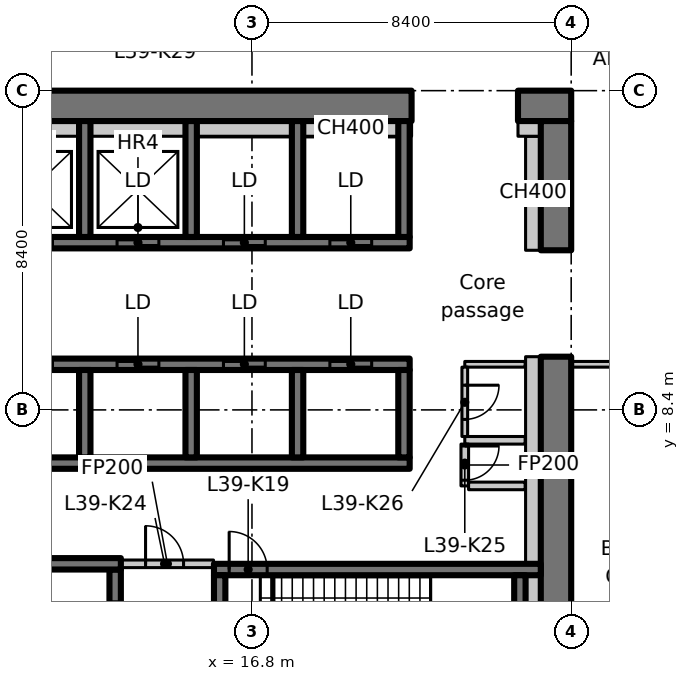
"""IFC4 building model, lengths in metres.
Left out: names, types, materials, properties, quantities, classifications, styles, units other than length and angle.
Written with IfcOpenShell. Run it as: python <this file> out.ifc"""

import sys

from ifc_helpers import new_model, si_unit, direction, frame, frame_2d, origin, place, context, subcontext, project, spatial, rectangle, extrude, element, fill, save


model = new_model("IFC4")
c1 = context("Model", 3, precision=1e-05, world=origin(), true_north=direction((0.0, 1.0)))
c2 = subcontext(c1, "Body", "Model", "MODEL_VIEW")
j1 = project(units=[si_unit("LENGTHUNIT", "METRE"), si_unit("PLANEANGLEUNIT", "RADIAN")], contexts=[c1])
p1 = place(None, origin())
s1 = spatial("IfcSite", under=j1, at=p1, CompositionType="ELEMENT")
p2 = place(p1, origin())
s2 = spatial("IfcBuilding", under=s1, at=p2, CompositionType="ELEMENT")
p3 = place(p2, frame((0.0, 0.0, 156.5)))
s3 = spatial("IfcBuildingStorey", under=s2, at=p3, CompositionType="ELEMENT", Elevation=156.5)
p4 = place(p3, frame((-1.1, 16.4, 0.0), z_axis=(0.0, 0.0, 1.0), x_axis=(1.0, 0.0, 0.0)))
e1 = element("IfcWall", 1, at=p4, inside=s3, PredefinedType="SHEAR", context=c2, shape_type="SweptSolid", body=[
    extrude(rectangle(XDim=22.1, YDim=0.8, at=frame_2d((11.05, 0.0))), origin(), (0.0, 0.0, 1.0), 5.2),
])
p5 = place(p4, frame((3.15, 0.0, 0.0)))
e2 = element("IfcOpeningElement", 2, at=p5, cuts=e1, PredefinedType="OPENING", context=c2, shape_type="SweptSolid", body=[
    extrude(rectangle(XDim=1.1, YDim=2.3, at=frame_2d((0.55, 1.15))), frame((0.0, 0.41, 0.0), z_axis=(0.0, -1.0, 0.0), x_axis=(1.0, 0.0, 0.0)), (0.0, 0.0, 1.0), 0.82),
])
p6 = place(p3, frame((23.8, 16.4, 0.0), z_axis=(0.0, 0.0, 1.0), x_axis=(1.0, 0.0, 0.0)))
e3 = element("IfcWall", 3, at=p6, inside=s3, PredefinedType="SHEAR", context=c2, shape_type="SweptSolid", body=[
    extrude(rectangle(XDim=1.4, YDim=0.8, at=frame_2d((0.7, 0.0))), origin(), (0.0, 0.0, 1.0), 5.2),
])
p7 = place(p3, frame((24.8, 0.8, 0.0), z_axis=(0.0, 0.0, 1.0), x_axis=(0.0, 1.0, 0.0)))
e4 = element("IfcWall", 4, at=p7, inside=s3, PredefinedType="SHEAR", context=c2, shape_type="SweptSolid", body=[
    extrude(rectangle(XDim=9.0, YDim=0.8, at=frame_2d((4.5, 0.0))), origin(), (0.0, 0.0, 1.0), 5.2),
])
p8 = place(p3, frame((24.8, 12.6, 0.0), z_axis=(0.0, 0.0, 1.0), x_axis=(0.0, 1.0, 0.0)))
e5 = element("IfcWall", 5, at=p8, inside=s3, PredefinedType="SHEAR", context=c2, shape_type="SweptSolid", body=[
    extrude(rectangle(XDim=3.4, YDim=0.8, at=frame_2d((1.7, 0.0))), origin(), (0.0, 0.0, 1.0), 5.2),
])
p9 = place(p3, frame((24.2, 12.6, 0.0), z_axis=(0.0, 0.0, 1.0), x_axis=(0.0, 1.0, 0.0)))
e6 = element("IfcWall", 6, at=p9, inside=s3, PredefinedType="PARTITIONING", context=c2, shape_type="SweptSolid", body=[
    extrude(rectangle(XDim=3.0, YDim=0.4, at=frame_2d((1.5, 0.0))), origin(), (0.0, 0.0, 1.0), 5.2),
])
p10 = place(p3, frame((23.8, 15.8, 0.0), z_axis=(0.0, 0.0, 1.0), x_axis=(1.0, 0.0, 0.0)))
e7 = element("IfcWall", 7, at=p10, inside=s3, PredefinedType="PARTITIONING", context=c2, shape_type="SweptSolid", body=[
    extrude(rectangle(XDim=0.6, YDim=0.4, at=frame_2d((0.3, 0.0))), origin(), (0.0, 0.0, 1.0), 5.2),
])
p11 = place(p3, frame((0.8, 7.0, 0.0), z_axis=(0.0, 0.0, 1.0), x_axis=(1.0, 0.0, 0.0)))
e8 = element("IfcWall", 8, at=p11, inside=s3, PredefinedType="SHEAR", context=c2, shape_type="SweptSolid", body=[
    extrude(rectangle(XDim=20.15, YDim=0.3, at=frame_2d((10.075, 0.0))), origin(), (0.0, 0.0, 1.0), 5.2),
])
p12 = place(p3, frame((0.8, 9.6, 0.0), z_axis=(0.0, 0.0, 1.0), x_axis=(1.0, 0.0, 0.0)))
e9 = element("IfcWall", 9, at=p12, inside=s3, PredefinedType="SHEAR", context=c2, shape_type="SweptSolid", body=[
    extrude(rectangle(XDim=20.15, YDim=0.3, at=frame_2d((10.075, 0.0))), origin(), (0.0, 0.0, 1.0), 5.2),
])
p13 = place(p12, frame((1.25, 0.0, 0.0)))
e10 = element("IfcOpeningElement", 10, at=p13, cuts=e9, PredefinedType="OPENING", context=c2, shape_type="SweptSolid", body=[
    extrude(rectangle(XDim=1.1, YDim=2.3, at=frame_2d((0.55, 1.15))), frame((0.0, 0.16, 0.0), z_axis=(0.0, -1.0, 0.0), x_axis=(1.0, 0.0, 0.0)), (0.0, 0.0, 1.0), 0.32),
])
p14 = place(p12, frame((4.05, 0.0, 0.0)))
e11 = element("IfcOpeningElement", 11, at=p14, cuts=e9, PredefinedType="OPENING", context=c2, shape_type="SweptSolid", body=[
    extrude(rectangle(XDim=1.1, YDim=2.3, at=frame_2d((0.55, 1.15))), frame((0.0, 0.16, 0.0), z_axis=(0.0, -1.0, 0.0), x_axis=(1.0, 0.0, 0.0)), (0.0, 0.0, 1.0), 0.32),
])
p15 = place(p12, frame((6.85, 0.0, 0.0)))
e12 = element("IfcOpeningElement", 12, at=p15, cuts=e9, PredefinedType="OPENING", context=c2, shape_type="SweptSolid", body=[
    extrude(rectangle(XDim=1.1, YDim=2.3, at=frame_2d((0.55, 1.15))), frame((0.0, 0.16, 0.0), z_axis=(0.0, -1.0, 0.0), x_axis=(1.0, 0.0, 0.0)), (0.0, 0.0, 1.0), 0.32),
])
p16 = place(p12, frame((9.65, 0.0, 0.0)))
e13 = element("IfcOpeningElement", 13, at=p16, cuts=e9, PredefinedType="OPENING", context=c2, shape_type="SweptSolid", body=[
    extrude(rectangle(XDim=1.1, YDim=2.3, at=frame_2d((0.55, 1.15))), frame((0.0, 0.16, 0.0), z_axis=(0.0, -1.0, 0.0), x_axis=(1.0, 0.0, 0.0)), (0.0, 0.0, 1.0), 0.32),
])
p17 = place(p12, frame((12.45, 0.0, 0.0)))
e14 = element("IfcOpeningElement", 14, at=p17, cuts=e9, PredefinedType="OPENING", context=c2, shape_type="SweptSolid", body=[
    extrude(rectangle(XDim=1.1, YDim=2.3, at=frame_2d((0.55, 1.15))), frame((0.0, 0.16, 0.0), z_axis=(0.0, -1.0, 0.0), x_axis=(1.0, 0.0, 0.0)), (0.0, 0.0, 1.0), 0.32),
])
p18 = place(p12, frame((15.25, 0.0, 0.0)))
e15 = element("IfcOpeningElement", 15, at=p18, cuts=e9, PredefinedType="OPENING", context=c2, shape_type="SweptSolid", body=[
    extrude(rectangle(XDim=1.1, YDim=2.3, at=frame_2d((0.55, 1.15))), frame((0.0, 0.16, 0.0), z_axis=(0.0, -1.0, 0.0), x_axis=(1.0, 0.0, 0.0)), (0.0, 0.0, 1.0), 0.32),
])
p19 = place(p12, frame((18.05, 0.0, 0.0)))
e16 = element("IfcOpeningElement", 16, at=p19, cuts=e9, PredefinedType="OPENING", context=c2, shape_type="SweptSolid", body=[
    extrude(rectangle(XDim=1.1, YDim=2.3, at=frame_2d((0.55, 1.15))), frame((0.0, 0.16, 0.0), z_axis=(0.0, -1.0, 0.0), x_axis=(1.0, 0.0, 0.0)), (0.0, 0.0, 1.0), 0.32),
])
for number, where, z_axis, x_axis in (
    (17, (12.4, 7.15, 0.0), (0.0, 0.0, 1.0), (0.0, 1.0, 0.0)),
    (18, (15.2, 7.15, 0.0), (0.0, 0.0, 1.0), (0.0, 1.0, 0.0)),
    (19, (18.0, 7.15, 0.0), (0.0, 0.0, 1.0), (0.0, 1.0, 0.0)),
    (20, (20.8, 7.15, 0.0), (0.0, 0.0, 1.0), (0.0, 1.0, 0.0)),
):
    element("IfcWall", number, at=place(p3, frame(where, z_axis=z_axis, x_axis=x_axis)), inside=s3, PredefinedType="SHEAR", context=c2, shape_type="SweptSolid", body=[
        extrude(rectangle(XDim=2.3, YDim=0.3, at=frame_2d((1.15, 0.0))), origin(), (0.0, 0.0, 1.0), 5.2),
    ])
p20 = place(p3, frame((0.8, 12.8, 0.0), z_axis=(0.0, 0.0, 1.0), x_axis=(1.0, 0.0, 0.0)))
e21 = element("IfcWall", 21, at=p20, inside=s3, PredefinedType="SHEAR", context=c2, shape_type="SweptSolid", body=[
    extrude(rectangle(XDim=20.15, YDim=0.3, at=frame_2d((10.075, 0.0))), origin(), (0.0, 0.0, 1.0), 5.2),
])
p21 = place(p20, frame((4.05, 0.0, 0.0)))
e22 = element("IfcOpeningElement", 22, at=p21, cuts=e21, PredefinedType="OPENING", context=c2, shape_type="SweptSolid", body=[
    extrude(rectangle(XDim=1.1, YDim=2.3, at=frame_2d((0.55, 1.15))), frame((0.0, 0.16, 0.0), z_axis=(0.0, -1.0, 0.0), x_axis=(1.0, 0.0, 0.0)), (0.0, 0.0, 1.0), 0.32),
])
p22 = place(p20, frame((6.85, 0.0, 0.0)))
e23 = element("IfcOpeningElement", 23, at=p22, cuts=e21, PredefinedType="OPENING", context=c2, shape_type="SweptSolid", body=[
    extrude(rectangle(XDim=1.1, YDim=2.3, at=frame_2d((0.55, 1.15))), frame((0.0, 0.16, 0.0), z_axis=(0.0, -1.0, 0.0), x_axis=(1.0, 0.0, 0.0)), (0.0, 0.0, 1.0), 0.32),
])
p23 = place(p20, frame((9.65, 0.0, 0.0)))
e24 = element("IfcOpeningElement", 24, at=p23, cuts=e21, PredefinedType="OPENING", context=c2, shape_type="SweptSolid", body=[
    extrude(rectangle(XDim=1.1, YDim=2.3, at=frame_2d((0.55, 1.15))), frame((0.0, 0.16, 0.0), z_axis=(0.0, -1.0, 0.0), x_axis=(1.0, 0.0, 0.0)), (0.0, 0.0, 1.0), 0.32),
])
p24 = place(p20, frame((12.45, 0.0, 0.0)))
e25 = element("IfcOpeningElement", 25, at=p24, cuts=e21, PredefinedType="OPENING", context=c2, shape_type="SweptSolid", body=[
    extrude(rectangle(XDim=1.1, YDim=2.3, at=frame_2d((0.55, 1.15))), frame((0.0, 0.16, 0.0), z_axis=(0.0, -1.0, 0.0), x_axis=(1.0, 0.0, 0.0)), (0.0, 0.0, 1.0), 0.32),
])
p25 = place(p20, frame((15.25, 0.0, 0.0)))
e26 = element("IfcOpeningElement", 26, at=p25, cuts=e21, PredefinedType="OPENING", context=c2, shape_type="SweptSolid", body=[
    extrude(rectangle(XDim=1.1, YDim=2.3, at=frame_2d((0.55, 1.15))), frame((0.0, 0.16, 0.0), z_axis=(0.0, -1.0, 0.0), x_axis=(1.0, 0.0, 0.0)), (0.0, 0.0, 1.0), 0.32),
])
p26 = place(p20, frame((18.05, 0.0, 0.0)))
e27 = element("IfcOpeningElement", 27, at=p26, cuts=e21, PredefinedType="OPENING", context=c2, shape_type="SweptSolid", body=[
    extrude(rectangle(XDim=1.1, YDim=2.3, at=frame_2d((0.55, 1.15))), frame((0.0, 0.16, 0.0), z_axis=(0.0, -1.0, 0.0), x_axis=(1.0, 0.0, 0.0)), (0.0, 0.0, 1.0), 0.32),
])
for number, where, z_axis, x_axis in (
    (28, (12.4, 12.95, 0.0), (0.0, 0.0, 1.0), (0.0, 1.0, 0.0)),
    (29, (15.2, 12.95, 0.0), (0.0, 0.0, 1.0), (0.0, 1.0, 0.0)),
    (30, (18.0, 12.95, 0.0), (0.0, 0.0, 1.0), (0.0, 1.0, 0.0)),
    (31, (20.8, 12.95, 0.0), (0.0, 0.0, 1.0), (0.0, 1.0, 0.0)),
):
    element("IfcWall", number, at=place(p3, frame(where, z_axis=z_axis, x_axis=x_axis)), inside=s3, PredefinedType="SHEAR", context=c2, shape_type="SweptSolid", body=[
        extrude(rectangle(XDim=3.05, YDim=0.3, at=frame_2d((1.525, 0.0))), origin(), (0.0, 0.0, 1.0), 5.2),
    ])
p27 = place(p3, frame((13.2, 0.8, 0.0), z_axis=(0.0, 0.0, 1.0), x_axis=(0.0, 1.0, 0.0)))
e32 = element("IfcWall", 32, at=p27, inside=s3, PredefinedType="SHEAR", context=c2, shape_type="SweptSolid", body=[
    extrude(rectangle(XDim=3.4, YDim=0.3, at=frame_2d((1.7, 0.0))), origin(), (0.0, 0.0, 1.0), 5.2),
])
p28 = place(p27, frame((1.45, 0.0, 0.0)))
e33 = element("IfcOpeningElement", 33, at=p28, cuts=e32, PredefinedType="OPENING", context=c2, shape_type="SweptSolid", body=[
    extrude(rectangle(XDim=1.1, YDim=2.3, at=frame_2d((0.55, 1.15))), frame((0.0, 0.16, 0.0), z_axis=(0.0, -1.0, 0.0), x_axis=(1.0, 0.0, 0.0)), (0.0, 0.0, 1.0), 0.32),
])
p29 = place(p3, frame((10.05, 4.35, 0.0), z_axis=(0.0, 0.0, 1.0), x_axis=(1.0, 0.0, 0.0)))
e34 = element("IfcWall", 34, at=p29, inside=s3, PredefinedType="SHEAR", context=c2, shape_type="SweptSolid", body=[
    extrude(rectangle(XDim=3.3, YDim=0.3, at=frame_2d((1.65, 0.0))), origin(), (0.0, 0.0, 1.0), 5.2),
])
p30 = place(p3, frame((15.8, 4.2, 0.0), z_axis=(0.0, 0.0, 1.0), x_axis=(1.0, 0.0, 0.0)))
e35 = element("IfcWall", 35, at=p30, inside=s3, PredefinedType="SHEAR", context=c2, shape_type="SweptSolid", body=[
    extrude(rectangle(XDim=8.6, YDim=0.3, at=frame_2d((4.3, 0.0))), origin(), (0.0, 0.0, 1.0), 5.2),
])
p31 = place(p30, frame((0.4, 0.0, 0.0)))
e36 = element("IfcOpeningElement", 36, at=p31, cuts=e35, PredefinedType="OPENING", context=c2, shape_type="SweptSolid", body=[
    extrude(rectangle(XDim=1.0, YDim=2.1, at=frame_2d((0.5, 1.05))), frame((0.0, 0.16, 0.0), z_axis=(0.0, -1.0, 0.0), x_axis=(1.0, 0.0, 0.0)), (0.0, 0.0, 1.0), 0.32),
])
p32 = place(p3, frame((15.95, 1.5, 0.0), z_axis=(0.0, 0.0, 1.0), x_axis=(0.0, 1.0, 0.0)))
e37 = element("IfcWall", 37, at=p32, inside=s3, PredefinedType="SHEAR", context=c2, shape_type="SweptSolid", body=[
    extrude(rectangle(XDim=2.55, YDim=0.3, at=frame_2d((1.275, 0.0))), origin(), (0.0, 0.0, 1.0), 5.2),
])
p33 = place(p32, frame((0.8, 0.0, 0.0)))
e38 = element("IfcOpeningElement", 38, at=p33, cuts=e37, PredefinedType="OPENING", context=c2, shape_type="SweptSolid", body=[
    extrude(rectangle(XDim=1.0, YDim=2.1, at=frame_2d((0.5, 1.05))), frame((0.0, 0.16, 0.0), z_axis=(0.0, -1.0, 0.0), x_axis=(1.0, 0.0, 0.0)), (0.0, 0.0, 1.0), 0.32),
])
p34 = place(p3, frame((23.85, 1.5, 0.0), z_axis=(0.0, 0.0, 1.0), x_axis=(0.0, 1.0, 0.0)))
e39 = element("IfcWall", 39, at=p34, inside=s3, PredefinedType="SHEAR", context=c2, shape_type="SweptSolid", body=[
    extrude(rectangle(XDim=2.55, YDim=0.3, at=frame_2d((1.275, 0.0))), origin(), (0.0, 0.0, 1.0), 5.2),
])
p35 = place(p3, frame((13.362, 4.35, 0.0), z_axis=(0.0, 0.0, 1.0), x_axis=(1.0, 0.0, 0.0)))
e40 = element("IfcWall", 40, at=p35, inside=s3, PredefinedType="PARTITIONING", context=c2, shape_type="SweptSolid", body=[
    extrude(rectangle(XDim=2.426, YDim=0.2, at=frame_2d((1.213, 0.0))), origin(), (0.0, 0.0, 1.0), 5.2),
])
p36 = place(p35, frame((0.638, 0.0, 0.0)))
e41 = element("IfcOpeningElement", 41, at=p36, cuts=e40, PredefinedType="OPENING", context=c2, shape_type="SweptSolid", body=[
    extrude(rectangle(XDim=1.0, YDim=2.1, at=frame_2d((0.5, 1.05))), frame((0.0, 0.11, 0.0), z_axis=(0.0, -1.0, 0.0), x_axis=(1.0, 0.0, 0.0)), (0.0, 0.0, 1.0), 0.22),
])
p37 = place(p3, frame((23.988, 7.6, 0.0), z_axis=(0.0, 0.0, 1.0), x_axis=(-1.0, 0.0, 0.0)))
e42 = element("IfcWall", 42, at=p37, inside=s3, PredefinedType="PARTITIONING", context=c2, shape_type="SweptSolid", body=[
    extrude(rectangle(XDim=1.588, YDim=0.2, at=frame_2d((0.794, 0.0))), origin(), (0.0, 0.0, 1.0), 5.2),
])
p38 = place(p3, frame((22.4, 7.5, 0.0), z_axis=(0.0, 0.0, 1.0), x_axis=(0.0, -1.0, 0.0)))
e43 = element("IfcWall", 43, at=p38, inside=s3, PredefinedType="PARTITIONING", context=c2, shape_type="SweptSolid", body=[
    extrude(rectangle(XDim=1.1, YDim=0.2, at=frame_2d((0.55, 0.0))), origin(), (0.0, 0.0, 1.0), 5.2),
])
p39 = place(p38, frame((0.05, 0.0, 0.0)))
e44 = element("IfcOpeningElement", 44, at=p39, cuts=e43, PredefinedType="OPENING", context=c2, shape_type="SweptSolid", body=[
    extrude(rectangle(XDim=0.9, YDim=2.1, at=frame_2d((0.45, 1.05))), frame((0.0, 0.11, 0.0), z_axis=(0.0, -1.0, 0.0), x_axis=(1.0, 0.0, 0.0)), (0.0, 0.0, 1.0), 0.22),
])
p40 = place(p3, frame((22.5, 6.4, 0.0), z_axis=(0.0, 0.0, 1.0), x_axis=(1.0, 0.0, 0.0)))
e45 = element("IfcWall", 45, at=p40, inside=s3, PredefinedType="PARTITIONING", context=c2, shape_type="SweptSolid", body=[
    extrude(rectangle(XDim=1.488, YDim=0.2, at=frame_2d((0.744, 0.0))), origin(), (0.0, 0.0, 1.0), 5.2),
])
p41 = place(p3, frame((23.988, 9.6, 0.0), z_axis=(0.0, 0.0, 1.0), x_axis=(-1.0, 0.0, 0.0)))
e46 = element("IfcWall", 46, at=p41, inside=s3, PredefinedType="PARTITIONING", context=c2, shape_type="SweptSolid", body=[
    extrude(rectangle(XDim=1.588, YDim=0.15, at=frame_2d((0.794, 0.0))), origin(), (0.0, 0.0, 1.0), 5.2),
])
p42 = place(p3, frame((22.4, 9.525, 0.0), z_axis=(0.0, 0.0, 1.0), x_axis=(0.0, -1.0, 0.0)))
e47 = element("IfcWall", 47, at=p42, inside=s3, PredefinedType="PARTITIONING", context=c2, shape_type="SweptSolid", body=[
    extrude(rectangle(XDim=1.825, YDim=0.15, at=frame_2d((0.913, 0.0))), origin(), (0.0, 0.0, 1.0), 5.2),
])
p43 = place(p42, frame((0.475, 0.0, 0.0)))
e48 = element("IfcOpeningElement", 48, at=p43, cuts=e47, PredefinedType="OPENING", context=c2, shape_type="SweptSolid", body=[
    extrude(rectangle(XDim=0.9, YDim=2.1, at=frame_2d((0.45, 1.05))), frame((0.0, 0.085, 0.0), z_axis=(0.0, -1.0, 0.0), x_axis=(1.0, 0.0, 0.0)), (0.0, 0.0, 1.0), 0.17),
])
for number, where, z_axis, x_axis in (
    (49, (9.75, 15.8, 0.0), (0.0, 0.0, 1.0), (1.0, 0.0, 0.0)),
    (50, (12.55, 15.8, 0.0), (0.0, 0.0, 1.0), (1.0, 0.0, 0.0)),
    (51, (15.35, 15.8, 0.0), (0.0, 0.0, 1.0), (1.0, 0.0, 0.0)),
    (52, (18.15, 15.8, 0.0), (0.0, 0.0, 1.0), (1.0, 0.0, 0.0)),
):
    element("IfcWall", number, at=place(p3, frame(where, z_axis=z_axis, x_axis=x_axis)), inside=s3, PredefinedType="PARTITIONING", context=c2, shape_type="SweptSolid", body=[
        extrude(rectangle(XDim=2.5, YDim=0.4, at=frame_2d((1.25, 0.0))), origin(), (0.0, 0.0, 1.0), 5.2),
    ])
p44 = place(p3, frame((20.95, 15.8, 0.0), z_axis=(0.0, 0.0, 1.0), x_axis=(1.0, 0.0, 0.0)))
e53 = element("IfcWall", 53, at=p44, inside=s3, PredefinedType="PARTITIONING", context=c2, shape_type="SweptSolid", body=[
    extrude(rectangle(XDim=0.05, YDim=0.4, at=frame_2d((0.025, 0.0))), origin(), (0.0, 0.0, 1.0), 5.2),
])
p45 = place(p3, frame((24.2, 1.5, 0.0), z_axis=(0.0, 0.0, 1.0), x_axis=(0.0, 1.0, 0.0)))
e54 = element("IfcWall", 54, at=p45, inside=s3, PredefinedType="PARTITIONING", context=c2, shape_type="SweptSolid", body=[
    extrude(rectangle(XDim=2.55, YDim=0.4, at=frame_2d((1.275, 0.0))), origin(), (0.0, 0.0, 1.0), 5.2),
])
p46 = place(p3, frame((24.2, 4.35, 0.0), z_axis=(0.0, 0.0, 1.0), x_axis=(0.0, 1.0, 0.0)))
e55 = element("IfcWall", 55, at=p46, inside=s3, PredefinedType="PARTITIONING", context=c2, shape_type="SweptSolid", body=[
    extrude(rectangle(XDim=5.45, YDim=0.4, at=frame_2d((2.725, 0.0))), origin(), (0.0, 0.0, 1.0), 5.2),
])
p47 = place(p3, frame((29.4, 9.6, 0.0), z_axis=(0.0, 0.0, 1.0), x_axis=(-1.0, 0.0, 0.0)))
e56 = element("IfcWall", 56, at=p47, inside=s3, PredefinedType="PARTITIONING", context=c2, shape_type="SweptSolid", body=[
    extrude(rectangle(XDim=4.2, YDim=0.15, at=frame_2d((2.1, 0.0))), origin(), (0.0, 0.0, 1.0), 5.18),
])
p48 = place(p47, frame((1.5, 0.0, 0.0)))
e57 = element("IfcOpeningElement", 57, at=p48, cuts=e56, PredefinedType="OPENING", context=c2, shape_type="SweptSolid", body=[
    extrude(rectangle(XDim=1.1, YDim=2.1, at=frame_2d((0.55, 1.05))), frame((0.0, 0.085, 0.0), z_axis=(0.0, -1.0, 0.0), x_axis=(1.0, 0.0, 0.0)), (0.0, 0.0, 1.0), 0.17),
])
p49 = place(p17, origin())
e58 = element("IfcDoor", 58, at=p49, inside=s3, OperationType="SLIDING_TO_LEFT", PredefinedType="DOOR", context=c2, shape_type="SweptSolid", body=[
    extrude(rectangle(XDim=1.1, YDim=2.3, at=frame_2d((0.55, 1.15))), frame((0.0, 0.025, 0.0), z_axis=(0.0, -1.0, 0.0), x_axis=(1.0, 0.0, 0.0)), (0.0, 0.0, 1.0), 0.05),
])
fill(e14, e58)
p50 = place(p18, origin())
e59 = element("IfcDoor", 59, at=p50, inside=s3, OperationType="SLIDING_TO_LEFT", PredefinedType="DOOR", context=c2, shape_type="SweptSolid", body=[
    extrude(rectangle(XDim=1.1, YDim=2.3, at=frame_2d((0.55, 1.15))), frame((0.0, 0.025, 0.0), z_axis=(0.0, -1.0, 0.0), x_axis=(1.0, 0.0, 0.0)), (0.0, 0.0, 1.0), 0.05),
])
fill(e15, e59)
p51 = place(p19, origin())
e60 = element("IfcDoor", 60, at=p51, inside=s3, OperationType="SLIDING_TO_LEFT", PredefinedType="DOOR", context=c2, shape_type="SweptSolid", body=[
    extrude(rectangle(XDim=1.1, YDim=2.3, at=frame_2d((0.55, 1.15))), frame((0.0, 0.025, 0.0), z_axis=(0.0, -1.0, 0.0), x_axis=(1.0, 0.0, 0.0)), (0.0, 0.0, 1.0), 0.05),
])
fill(e16, e60)
p52 = place(p24, origin())
e61 = element("IfcDoor", 61, at=p52, inside=s3, OperationType="SLIDING_TO_LEFT", PredefinedType="DOOR", context=c2, shape_type="SweptSolid", body=[
    extrude(rectangle(XDim=1.1, YDim=2.3, at=frame_2d((0.55, 1.15))), frame((0.0, 0.025, 0.0), z_axis=(0.0, -1.0, 0.0), x_axis=(1.0, 0.0, 0.0)), (0.0, 0.0, 1.0), 0.05),
])
fill(e25, e61)
p53 = place(p25, origin())
e62 = element("IfcDoor", 62, at=p53, inside=s3, OperationType="SLIDING_TO_LEFT", PredefinedType="DOOR", context=c2, shape_type="SweptSolid", body=[
    extrude(rectangle(XDim=1.1, YDim=2.3, at=frame_2d((0.55, 1.15))), frame((0.0, 0.025, 0.0), z_axis=(0.0, -1.0, 0.0), x_axis=(1.0, 0.0, 0.0)), (0.0, 0.0, 1.0), 0.05),
])
fill(e26, e62)
p54 = place(p26, origin())
e63 = element("IfcDoor", 63, at=p54, inside=s3, OperationType="SLIDING_TO_LEFT", PredefinedType="DOOR", context=c2, shape_type="SweptSolid", body=[
    extrude(rectangle(XDim=1.1, YDim=2.3, at=frame_2d((0.55, 1.15))), frame((0.0, 0.025, 0.0), z_axis=(0.0, -1.0, 0.0), x_axis=(1.0, 0.0, 0.0)), (0.0, 0.0, 1.0), 0.05),
])
fill(e27, e63)
p55 = place(p31, origin())
e64 = element("IfcDoor", 64, at=p55, inside=s3, OperationType="SINGLE_SWING_LEFT", PredefinedType="DOOR", context=c2, shape_type="SweptSolid", body=[
    extrude(rectangle(XDim=1.0, YDim=2.1, at=frame_2d((0.5, 1.05))), frame((0.0, 0.025, 0.0), z_axis=(0.0, -1.0, 0.0), x_axis=(1.0, 0.0, 0.0)), (0.0, 0.0, 1.0), 0.05),
])
fill(e36, e64)
p56 = place(p36, origin())
e65 = element("IfcDoor", 65, at=p56, inside=s3, OperationType="SINGLE_SWING_RIGHT", PredefinedType="DOOR", context=c2, shape_type="SweptSolid", body=[
    extrude(rectangle(XDim=1.0, YDim=2.1, at=frame_2d((0.5, 1.05))), frame((0.0, 0.025, 0.0), z_axis=(0.0, -1.0, 0.0), x_axis=(1.0, 0.0, 0.0)), (0.0, 0.0, 1.0), 0.05),
])
fill(e41, e65)
p57 = place(p39, origin())
e66 = element("IfcDoor", 66, at=p57, inside=s3, OperationType="SINGLE_SWING_LEFT", PredefinedType="DOOR", context=c2, shape_type="SweptSolid", body=[
    extrude(rectangle(XDim=0.9, YDim=2.1, at=frame_2d((0.45, 1.05))), frame((0.0, 0.025, 0.0), z_axis=(0.0, -1.0, 0.0), x_axis=(1.0, 0.0, 0.0)), (0.0, 0.0, 1.0), 0.05),
])
fill(e44, e66)
p58 = place(p43, origin())
e67 = element("IfcDoor", 67, at=p58, inside=s3, OperationType="SINGLE_SWING_RIGHT", PredefinedType="DOOR", context=c2, shape_type="SweptSolid", body=[
    extrude(rectangle(XDim=0.9, YDim=2.1, at=frame_2d((0.45, 1.05))), frame((0.0, 0.025, 0.0), z_axis=(0.0, -1.0, 0.0), x_axis=(1.0, 0.0, 0.0)), (0.0, 0.0, 1.0), 0.05),
])
fill(e48, e67)
save(model, sys.argv[1])
